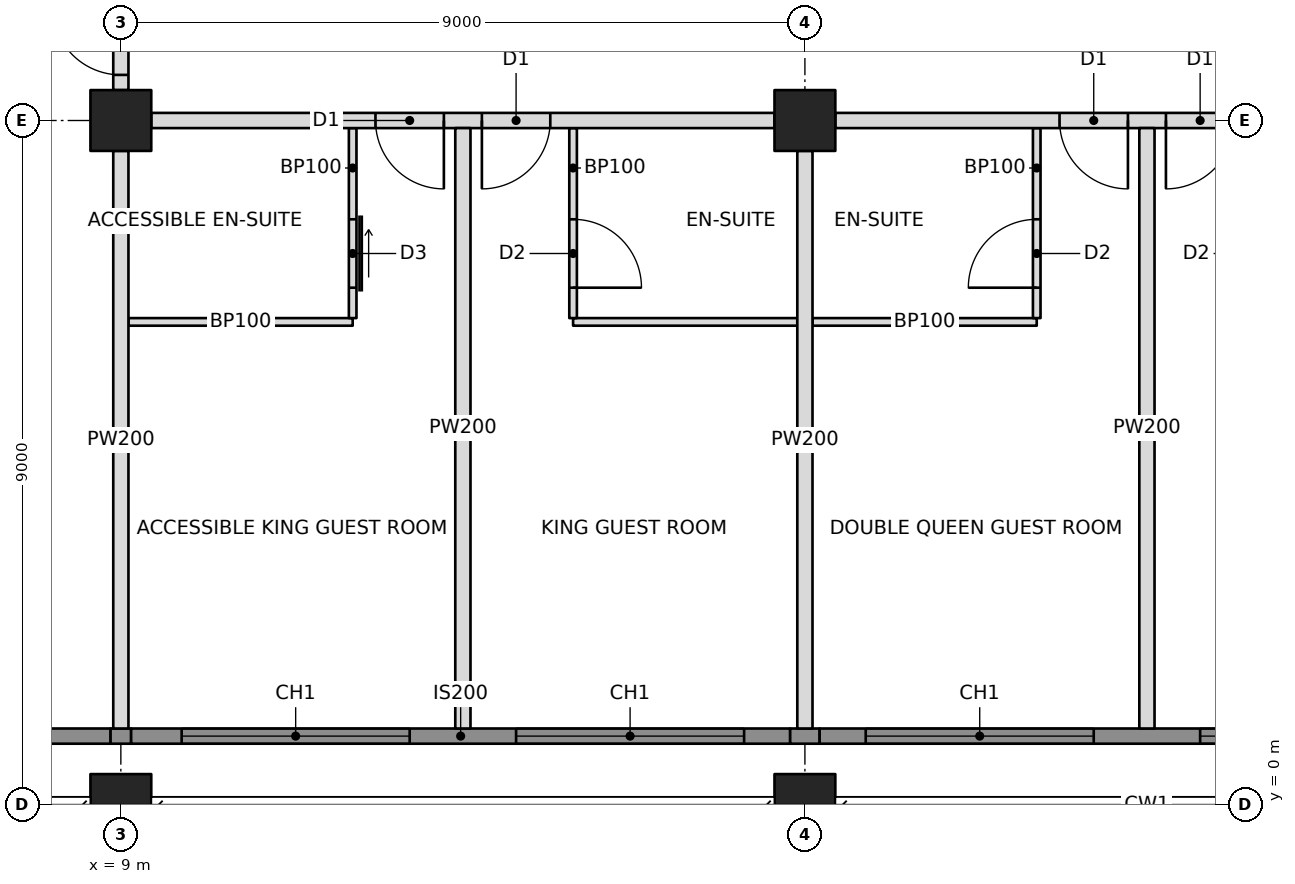
"""IFC4 building model, lengths in metres.
Left out: names, types, materials, properties, quantities, classifications, styles, units other than length and angle.
Written with IfcOpenShell. Run it as: python <this file> out.ifc"""

import sys

from ifc_helpers import new_model, si_unit, direction, frame, frame_2d, origin, origin_2d, place, context, subcontext, project, spatial, rectangle, hollow_rectangle, extrude, element, fill, save


model = new_model("IFC4")
c1 = context("Model", 3, precision=1e-05, world=origin(), true_north=direction((0.0, 1.0)))
c2 = subcontext(c1, "Body", "Model", "MODEL_VIEW")
j1 = project(units=[si_unit("LENGTHUNIT", "METRE"), si_unit("PLANEANGLEUNIT", "RADIAN")], contexts=[c1])
p1 = place(None, origin())
s1 = spatial("IfcSite", under=j1, at=p1, CompositionType="ELEMENT")
p2 = place(p1, origin())
s2 = spatial("IfcBuilding", under=s1, at=p2, CompositionType="ELEMENT")
p3 = place(p2, frame((0.0, 0.0, 170.6)))
s3 = spatial("IfcBuildingStorey", under=s2, at=p3, CompositionType="ELEMENT", Elevation=170.6)
p4 = place(p3, frame((9.0, 0.0, 0.0), z_axis=(0.0, 0.0, 1.0), x_axis=(1.0, 0.0, 0.0)))
e1 = element("IfcColumn", 1, at=p4, inside=s3, PredefinedType="COLUMN", context=c2, shape_type="SweptSolid", body=[
    extrude(hollow_rectangle(XDim=0.8, YDim=0.8, WallThickness=0.07, at=origin_2d()), origin(), (0.0, 0.0, 1.0), 3.4),
])
p5 = place(p3, frame((9.0, 9.0, 0.0), z_axis=(0.0, 0.0, 1.0), x_axis=(1.0, 0.0, 0.0)))
e2 = element("IfcColumn", 2, at=p5, inside=s3, PredefinedType="COLUMN", context=c2, shape_type="SweptSolid", body=[
    extrude(hollow_rectangle(XDim=0.8, YDim=0.8, WallThickness=0.06, at=origin_2d()), origin(), (0.0, 0.0, 1.0), 3.4),
])
p6 = place(p3, frame((18.0, 0.0, 0.0), z_axis=(0.0, 0.0, 1.0), x_axis=(1.0, 0.0, 0.0)))
e3 = element("IfcColumn", 3, at=p6, inside=s3, PredefinedType="COLUMN", context=c2, shape_type="SweptSolid", body=[
    extrude(hollow_rectangle(XDim=0.8, YDim=0.8, WallThickness=0.07, at=origin_2d()), origin(), (0.0, 0.0, 1.0), 3.4),
])
p7 = place(p3, frame((18.0, 9.0, 0.0), z_axis=(0.0, 0.0, 1.0), x_axis=(1.0, 0.0, 0.0)))
e4 = element("IfcColumn", 4, at=p7, inside=s3, PredefinedType="COLUMN", context=c2, shape_type="SweptSolid", body=[
    extrude(hollow_rectangle(XDim=0.8, YDim=0.8, WallThickness=0.06, at=origin_2d()), origin(), (0.0, 0.0, 1.0), 3.4),
])
p8 = place(p3, frame((3.0, 0.9, 0.0), z_axis=(0.0, 0.0, 1.0), x_axis=(1.0, 0.0, 0.0)))
e5 = element("IfcWall", 5, at=p8, inside=s3, PredefinedType="SOLIDWALL", context=c2, shape_type="SweptSolid", body=[
    extrude(rectangle(XDim=5.865, YDim=0.2, at=frame_2d((2.932, 0.0))), origin(), (0.0, 0.0, 1.0), 3.2),
])
p9 = place(p8, frame((1.45, 0.0, 0.6)))
e6 = element("IfcOpeningElement", 6, at=p9, cuts=e5, PredefinedType="OPENING", context=c2, shape_type="SweptSolid", body=[
    extrude(rectangle(XDim=3.0, YDim=2.2, at=frame_2d((1.5, 1.1))), frame((0.0, 0.11, 0.0), z_axis=(0.0, -1.0, 0.0), x_axis=(1.0, 0.0, 0.0)), (0.0, 0.0, 1.0), 0.22),
])
p10 = place(p3, frame((9.4, 9.0, 0.0), z_axis=(0.0, 0.0, 1.0), x_axis=(1.0, 0.0, 0.0)))
e7 = element("IfcWall", 7, at=p10, inside=s3, PredefinedType="PARTITIONING", context=c2, shape_type="SweptSolid", body=[
    extrude(rectangle(XDim=8.2, YDim=0.2, at=frame_2d((4.1, 0.0))), origin(), (0.0, 0.0, 1.0), 2.405),
])
p11 = place(p10, frame((2.95, 0.0, 0.0)))
e8 = element("IfcOpeningElement", 8, at=p11, cuts=e7, PredefinedType="OPENING", context=c2, shape_type="SweptSolid", body=[
    extrude(rectangle(XDim=0.9, YDim=2.1, at=frame_2d((0.45, 1.05))), frame((0.0, 0.11, 0.0), z_axis=(0.0, -1.0, 0.0), x_axis=(1.0, 0.0, 0.0)), (0.0, 0.0, 1.0), 0.22),
])
p12 = place(p10, frame((4.35, 0.0, 0.0)))
e9 = element("IfcOpeningElement", 9, at=p12, cuts=e7, PredefinedType="OPENING", context=c2, shape_type="SweptSolid", body=[
    extrude(rectangle(XDim=0.9, YDim=2.1, at=frame_2d((0.45, 1.05))), frame((0.0, 0.11, 0.0), z_axis=(0.0, -1.0, 0.0), x_axis=(1.0, 0.0, 0.0)), (0.0, 0.0, 1.0), 0.22),
])
p13 = place(p3, frame((18.4, 9.0, 0.0), z_axis=(0.0, 0.0, 1.0), x_axis=(1.0, 0.0, 0.0)))
e10 = element("IfcWall", 10, at=p13, inside=s3, PredefinedType="PARTITIONING", context=c2, shape_type="SweptSolid", body=[
    extrude(rectangle(XDim=8.2, YDim=0.2, at=frame_2d((4.1, 0.0))), origin(), (0.0, 0.0, 1.0), 2.405),
])
p14 = place(p13, frame((2.95, 0.0, 0.0)))
e11 = element("IfcOpeningElement", 11, at=p14, cuts=e10, PredefinedType="OPENING", context=c2, shape_type="SweptSolid", body=[
    extrude(rectangle(XDim=0.9, YDim=2.1, at=frame_2d((0.45, 1.05))), frame((0.0, 0.11, 0.0), z_axis=(0.0, -1.0, 0.0), x_axis=(1.0, 0.0, 0.0)), (0.0, 0.0, 1.0), 0.22),
])
p15 = place(p13, frame((4.35, 0.0, 0.0)))
e12 = element("IfcOpeningElement", 12, at=p15, cuts=e10, PredefinedType="OPENING", context=c2, shape_type="SweptSolid", body=[
    extrude(rectangle(XDim=0.9, YDim=2.1, at=frame_2d((0.45, 1.05))), frame((0.0, 0.11, 0.0), z_axis=(0.0, -1.0, 0.0), x_axis=(1.0, 0.0, 0.0)), (0.0, 0.0, 1.0), 0.22),
])
p16 = place(p3, frame((9.0, 8.6, 0.0), z_axis=(0.0, 0.0, 1.0), x_axis=(0.0, -1.0, 0.0)))
e13 = element("IfcWall", 13, at=p16, inside=s3, PredefinedType="PARTITIONING", context=c2, shape_type="SweptSolid", body=[
    extrude(rectangle(XDim=7.6, YDim=0.2, at=frame_2d((3.8, 0.0))), origin(), (0.0, 0.0, 1.0), 2.438),
])
p17 = place(p3, frame((13.5, 8.9, 0.0), z_axis=(0.0, 0.0, 1.0), x_axis=(0.0, -1.0, 0.0)))
e14 = element("IfcWall", 14, at=p17, inside=s3, PredefinedType="PARTITIONING", context=c2, shape_type="SweptSolid", body=[
    extrude(rectangle(XDim=7.9, YDim=0.2, at=frame_2d((3.95, 0.0))), origin(), (0.0, 0.0, 1.0), 2.404),
])
p18 = place(p3, frame((18.0, 8.6, 0.0), z_axis=(0.0, 0.0, 1.0), x_axis=(0.0, -1.0, 0.0)))
e15 = element("IfcWall", 15, at=p18, inside=s3, PredefinedType="PARTITIONING", context=c2, shape_type="SweptSolid", body=[
    extrude(rectangle(XDim=7.6, YDim=0.2, at=frame_2d((3.8, 0.0))), origin(), (0.0, 0.0, 1.0), 2.405),
])
p19 = place(p3, frame((22.5, 8.9, 0.0), z_axis=(0.0, 0.0, 1.0), x_axis=(0.0, -1.0, 0.0)))
e16 = element("IfcWall", 16, at=p19, inside=s3, PredefinedType="PARTITIONING", context=c2, shape_type="SweptSolid", body=[
    extrude(rectangle(XDim=7.9, YDim=0.2, at=frame_2d((3.95, 0.0))), origin(), (0.0, 0.0, 1.0), 2.404),
])
p20 = place(p3, frame((9.1, 6.35, 0.0), z_axis=(0.0, 0.0, 1.0), x_axis=(1.0, 0.0, 0.0)))
e17 = element("IfcWall", 17, at=p20, inside=s3, PredefinedType="PARTITIONING", context=c2, shape_type="SweptSolid", body=[
    extrude(rectangle(XDim=2.95, YDim=0.1, at=frame_2d((1.475, 0.0))), origin(), (0.0, 0.0, 1.0), 2.438),
])
p21 = place(p3, frame((12.05, 8.9, 0.0), z_axis=(0.0, 0.0, 1.0), x_axis=(0.0, -1.0, 0.0)))
e18 = element("IfcWall", 18, at=p21, inside=s3, PredefinedType="PARTITIONING", context=c2, shape_type="SweptSolid", body=[
    extrude(rectangle(XDim=2.5, YDim=0.1, at=frame_2d((1.25, 0.0))), origin(), (0.0, 0.0, 1.0), 2.404),
])
p22 = place(p21, frame((1.2, 0.0, 0.0)))
e19 = element("IfcOpeningElement", 19, at=p22, cuts=e18, PredefinedType="OPENING", context=c2, shape_type="SweptSolid", body=[
    extrude(rectangle(XDim=0.9, YDim=2.1, at=frame_2d((0.45, 1.05))), frame((0.0, 0.06, 0.0), z_axis=(0.0, -1.0, 0.0), x_axis=(1.0, 0.0, 0.0)), (0.0, 0.0, 1.0), 0.12),
])
p23 = place(p3, frame((14.95, 6.35, 0.0), z_axis=(0.0, 0.0, 1.0), x_axis=(1.0, 0.0, 0.0)))
e20 = element("IfcWall", 20, at=p23, inside=s3, PredefinedType="PARTITIONING", context=c2, shape_type="SweptSolid", body=[
    extrude(rectangle(XDim=2.95, YDim=0.1, at=frame_2d((1.475, 0.0))), origin(), (0.0, 0.0, 1.0), 2.404),
])
p24 = place(p3, frame((14.95, 8.9, 0.0), z_axis=(0.0, 0.0, 1.0), x_axis=(0.0, -1.0, 0.0)))
e21 = element("IfcWall", 21, at=p24, inside=s3, PredefinedType="PARTITIONING", context=c2, shape_type="SweptSolid", body=[
    extrude(rectangle(XDim=2.5, YDim=0.1, at=frame_2d((1.25, 0.0))), origin(), (0.0, 0.0, 1.0), 2.404),
])
p25 = place(p24, frame((1.2, 0.0, 0.0)))
e22 = element("IfcOpeningElement", 22, at=p25, cuts=e21, PredefinedType="OPENING", context=c2, shape_type="SweptSolid", body=[
    extrude(rectangle(XDim=0.9, YDim=2.1, at=frame_2d((0.45, 1.05))), frame((0.0, 0.06, 0.0), z_axis=(0.0, -1.0, 0.0), x_axis=(1.0, 0.0, 0.0)), (0.0, 0.0, 1.0), 0.12),
])
p26 = place(p3, frame((18.1, 6.35, 0.0), z_axis=(0.0, 0.0, 1.0), x_axis=(1.0, 0.0, 0.0)))
e23 = element("IfcWall", 23, at=p26, inside=s3, PredefinedType="PARTITIONING", context=c2, shape_type="SweptSolid", body=[
    extrude(rectangle(XDim=2.95, YDim=0.1, at=frame_2d((1.475, 0.0))), origin(), (0.0, 0.0, 1.0), 2.404),
])
p27 = place(p3, frame((21.05, 8.9, 0.0), z_axis=(0.0, 0.0, 1.0), x_axis=(0.0, -1.0, 0.0)))
e24 = element("IfcWall", 24, at=p27, inside=s3, PredefinedType="PARTITIONING", context=c2, shape_type="SweptSolid", body=[
    extrude(rectangle(XDim=2.5, YDim=0.1, at=frame_2d((1.25, 0.0))), origin(), (0.0, 0.0, 1.0), 2.404),
])
p28 = place(p27, frame((1.2, 0.0, 0.0)))
e25 = element("IfcOpeningElement", 25, at=p28, cuts=e24, PredefinedType="OPENING", context=c2, shape_type="SweptSolid", body=[
    extrude(rectangle(XDim=0.9, YDim=2.1, at=frame_2d((0.45, 1.05))), frame((0.0, 0.06, 0.0), z_axis=(0.0, -1.0, 0.0), x_axis=(1.0, 0.0, 0.0)), (0.0, 0.0, 1.0), 0.12),
])
p29 = place(p3, frame((9.0, 9.4, 0.0), z_axis=(0.0, 0.0, 1.0), x_axis=(0.0, 1.0, 0.0)))
e26 = element("IfcWall", 26, at=p29, inside=s3, PredefinedType="PARTITIONING", context=c2, shape_type="SweptSolid", body=[
    extrude(rectangle(XDim=1.3, YDim=0.2, at=frame_2d((0.65, 0.0))), origin(), (0.0, 0.0, 1.0), 2.405),
])
p30 = place(p29, frame((0.2, 0.0, 0.0)))
e27 = element("IfcOpeningElement", 27, at=p30, cuts=e26, PredefinedType="OPENING", context=c2, shape_type="SweptSolid", body=[
    extrude(rectangle(XDim=0.9, YDim=2.1, at=frame_2d((0.45, 1.05))), frame((0.0, 0.11, 0.0), z_axis=(0.0, -1.0, 0.0), x_axis=(1.0, 0.0, 0.0)), (0.0, 0.0, 1.0), 0.22),
])
p31 = place(p3, frame((8.865, 0.9, 0.0), z_axis=(0.0, 0.0, 1.0), x_axis=(1.0, 0.0, 0.0)))
e28 = element("IfcWall", 28, at=p31, inside=s3, PredefinedType="SOLIDWALL", context=c2, shape_type="SweptSolid", body=[
    extrude(rectangle(XDim=0.271, YDim=0.2, at=frame_2d((0.135, 0.0))), origin(), (0.0, 0.0, 1.0), 2.438),
])
p32 = place(p3, frame((9.135, 0.9, 0.0), z_axis=(0.0, 0.0, 1.0), x_axis=(1.0, 0.0, 0.0)))
e29 = element("IfcWall", 29, at=p32, inside=s3, PredefinedType="SOLIDWALL", context=c2, shape_type="SweptSolid", body=[
    extrude(rectangle(XDim=8.671, YDim=0.2, at=frame_2d((4.335, 0.0))), origin(), (0.0, 0.0, 1.0), 3.2),
])
p33 = place(p32, frame((0.665, 0.0, 0.6)))
e30 = element("IfcOpeningElement", 30, at=p33, cuts=e29, PredefinedType="OPENING", context=c2, shape_type="SweptSolid", body=[
    extrude(rectangle(XDim=3.0, YDim=2.2, at=frame_2d((1.5, 1.1))), frame((0.0, 0.11, 0.0), z_axis=(0.0, -1.0, 0.0), x_axis=(1.0, 0.0, 0.0)), (0.0, 0.0, 1.0), 0.22),
])
p34 = place(p32, frame((5.065, 0.0, 0.6)))
e31 = element("IfcOpeningElement", 31, at=p34, cuts=e29, PredefinedType="OPENING", context=c2, shape_type="SweptSolid", body=[
    extrude(rectangle(XDim=3.0, YDim=2.2, at=frame_2d((1.5, 1.1))), frame((0.0, 0.11, 0.0), z_axis=(0.0, -1.0, 0.0), x_axis=(1.0, 0.0, 0.0)), (0.0, 0.0, 1.0), 0.22),
])
p35 = place(p3, frame((17.806, 0.9, 0.0), z_axis=(0.0, 0.0, 1.0), x_axis=(1.0, 0.0, 0.0)))
e32 = element("IfcWall", 32, at=p35, inside=s3, PredefinedType="SOLIDWALL", context=c2, shape_type="SweptSolid", body=[
    extrude(rectangle(XDim=0.388, YDim=0.2, at=frame_2d((0.194, 0.0))), origin(), (0.0, 0.0, 1.0), 2.404),
])
p36 = place(p3, frame((18.194, 0.9, 0.0), z_axis=(0.0, 0.0, 1.0), x_axis=(1.0, 0.0, 0.0)))
e33 = element("IfcWall", 33, at=p36, inside=s3, PredefinedType="SOLIDWALL", context=c2, shape_type="SweptSolid", body=[
    extrude(rectangle(XDim=8.612, YDim=0.2, at=frame_2d((4.306, 0.0))), origin(), (0.0, 0.0, 1.0), 3.2),
])
p37 = place(p36, frame((0.606, 0.0, 0.6)))
e34 = element("IfcOpeningElement", 34, at=p37, cuts=e33, PredefinedType="OPENING", context=c2, shape_type="SweptSolid", body=[
    extrude(rectangle(XDim=3.0, YDim=2.2, at=frame_2d((1.5, 1.1))), frame((0.0, 0.11, 0.0), z_axis=(0.0, -1.0, 0.0), x_axis=(1.0, 0.0, 0.0)), (0.0, 0.0, 1.0), 0.22),
])
p38 = place(p36, frame((5.006, 0.0, 0.6)))
e35 = element("IfcOpeningElement", 35, at=p38, cuts=e33, PredefinedType="OPENING", context=c2, shape_type="SweptSolid", body=[
    extrude(rectangle(XDim=3.0, YDim=2.2, at=frame_2d((1.5, 1.1))), frame((0.0, 0.11, 0.0), z_axis=(0.0, -1.0, 0.0), x_axis=(1.0, 0.0, 0.0)), (0.0, 0.0, 1.0), 0.22),
])
p39 = place(p33, origin())
e36 = element("IfcWindow", 36, at=p39, inside=s3, PartitioningType="TRIPLE_PANEL_VERTICAL", PredefinedType="WINDOW", context=c2, shape_type="SweptSolid", body=[
    extrude(rectangle(XDim=3.0, YDim=2.2, at=frame_2d((1.5, 1.1))), frame((0.0, 0.03, 0.0), z_axis=(0.0, -1.0, 0.0), x_axis=(1.0, 0.0, 0.0)), (0.0, 0.0, 1.0), 0.06),
])
fill(e30, e36)
p40 = place(p34, origin())
e37 = element("IfcWindow", 37, at=p40, inside=s3, PartitioningType="TRIPLE_PANEL_VERTICAL", PredefinedType="WINDOW", context=c2, shape_type="SweptSolid", body=[
    extrude(rectangle(XDim=3.0, YDim=2.2, at=frame_2d((1.5, 1.1))), frame((0.0, 0.03, 0.0), z_axis=(0.0, -1.0, 0.0), x_axis=(1.0, 0.0, 0.0)), (0.0, 0.0, 1.0), 0.06),
])
fill(e31, e37)
p41 = place(p37, origin())
e38 = element("IfcWindow", 38, at=p41, inside=s3, PartitioningType="TRIPLE_PANEL_VERTICAL", PredefinedType="WINDOW", context=c2, shape_type="SweptSolid", body=[
    extrude(rectangle(XDim=3.0, YDim=2.2, at=frame_2d((1.5, 1.1))), frame((0.0, 0.03, 0.0), z_axis=(0.0, -1.0, 0.0), x_axis=(1.0, 0.0, 0.0)), (0.0, 0.0, 1.0), 0.06),
])
fill(e34, e38)
p42 = place(p38, origin())
e39 = element("IfcWindow", 39, at=p42, inside=s3, PartitioningType="TRIPLE_PANEL_VERTICAL", PredefinedType="WINDOW", context=c2, shape_type="SweptSolid", body=[
    extrude(rectangle(XDim=3.0, YDim=2.2, at=frame_2d((1.5, 1.1))), frame((0.0, 0.03, 0.0), z_axis=(0.0, -1.0, 0.0), x_axis=(1.0, 0.0, 0.0)), (0.0, 0.0, 1.0), 0.06),
])
fill(e35, e39)
p43 = place(p22, origin())
e40 = element("IfcDoor", 40, at=p43, inside=s3, OperationType="SLIDING_TO_LEFT", PredefinedType="DOOR", context=c2, shape_type="SweptSolid", body=[
    extrude(rectangle(XDim=0.9, YDim=2.1, at=frame_2d((0.45, 1.05))), frame((0.0, 0.025, 0.0), z_axis=(0.0, -1.0, 0.0), x_axis=(1.0, 0.0, 0.0)), (0.0, 0.0, 1.0), 0.05),
])
fill(e19, e40)
p44 = place(p11, frame((0.9, 0.0, 0.0), z_axis=(0.0, 0.0, 1.0), x_axis=(-1.0, 0.0, 0.0)))
e41 = element("IfcDoor", 41, at=p44, inside=s3, OperationType="SINGLE_SWING_LEFT", PredefinedType="DOOR", context=c2, shape_type="SweptSolid", body=[
    extrude(rectangle(XDim=0.9, YDim=2.1, at=frame_2d((0.45, 1.05))), frame((0.0, 0.025, 0.0), z_axis=(0.0, -1.0, 0.0), x_axis=(1.0, 0.0, 0.0)), (0.0, 0.0, 1.0), 0.05),
])
fill(e8, e41)
p45 = place(p25, origin())
e42 = element("IfcDoor", 42, at=p45, inside=s3, OperationType="SINGLE_SWING_RIGHT", PredefinedType="DOOR", context=c2, shape_type="SweptSolid", body=[
    extrude(rectangle(XDim=0.9, YDim=2.1, at=frame_2d((0.45, 1.05))), frame((0.0, 0.025, 0.0), z_axis=(0.0, -1.0, 0.0), x_axis=(1.0, 0.0, 0.0)), (0.0, 0.0, 1.0), 0.05),
])
fill(e22, e42)
p46 = place(p12, frame((0.9, 0.0, 0.0), z_axis=(0.0, 0.0, 1.0), x_axis=(-1.0, 0.0, 0.0)))
e43 = element("IfcDoor", 43, at=p46, inside=s3, OperationType="SINGLE_SWING_RIGHT", PredefinedType="DOOR", context=c2, shape_type="SweptSolid", body=[
    extrude(rectangle(XDim=0.9, YDim=2.1, at=frame_2d((0.45, 1.05))), frame((0.0, 0.025, 0.0), z_axis=(0.0, -1.0, 0.0), x_axis=(1.0, 0.0, 0.0)), (0.0, 0.0, 1.0), 0.05),
])
fill(e9, e43)
p47 = place(p28, frame((0.9, 0.0, 0.0), z_axis=(0.0, 0.0, 1.0), x_axis=(-1.0, 0.0, 0.0)))
e44 = element("IfcDoor", 44, at=p47, inside=s3, OperationType="SINGLE_SWING_LEFT", PredefinedType="DOOR", context=c2, shape_type="SweptSolid", body=[
    extrude(rectangle(XDim=0.9, YDim=2.1, at=frame_2d((0.45, 1.05))), frame((0.0, 0.025, 0.0), z_axis=(0.0, -1.0, 0.0), x_axis=(1.0, 0.0, 0.0)), (0.0, 0.0, 1.0), 0.05),
])
fill(e25, e44)
p48 = place(p14, frame((0.9, 0.0, 0.0), z_axis=(0.0, 0.0, 1.0), x_axis=(-1.0, 0.0, 0.0)))
e45 = element("IfcDoor", 45, at=p48, inside=s3, OperationType="SINGLE_SWING_LEFT", PredefinedType="DOOR", context=c2, shape_type="SweptSolid", body=[
    extrude(rectangle(XDim=0.9, YDim=2.1, at=frame_2d((0.45, 1.05))), frame((0.0, 0.025, 0.0), z_axis=(0.0, -1.0, 0.0), x_axis=(1.0, 0.0, 0.0)), (0.0, 0.0, 1.0), 0.05),
])
fill(e11, e45)
p49 = place(p15, frame((0.9, 0.0, 0.0), z_axis=(0.0, 0.0, 1.0), x_axis=(-1.0, 0.0, 0.0)))
e46 = element("IfcDoor", 46, at=p49, inside=s3, OperationType="SINGLE_SWING_RIGHT", PredefinedType="DOOR", context=c2, shape_type="SweptSolid", body=[
    extrude(rectangle(XDim=0.9, YDim=2.1, at=frame_2d((0.45, 1.05))), frame((0.0, 0.025, 0.0), z_axis=(0.0, -1.0, 0.0), x_axis=(1.0, 0.0, 0.0)), (0.0, 0.0, 1.0), 0.05),
])
fill(e12, e46)
p50 = place(p30, origin())
e47 = element("IfcDoor", 47, at=p50, inside=s3, OperationType="SINGLE_SWING_RIGHT", PredefinedType="DOOR", context=c2, shape_type="SweptSolid", body=[
    extrude(rectangle(XDim=0.9, YDim=2.1, at=frame_2d((0.45, 1.05))), frame((0.0, 0.025, 0.0), z_axis=(0.0, -1.0, 0.0), x_axis=(1.0, 0.0, 0.0)), (0.0, 0.0, 1.0), 0.05),
])
fill(e27, e47)
save(model, sys.argv[1])
